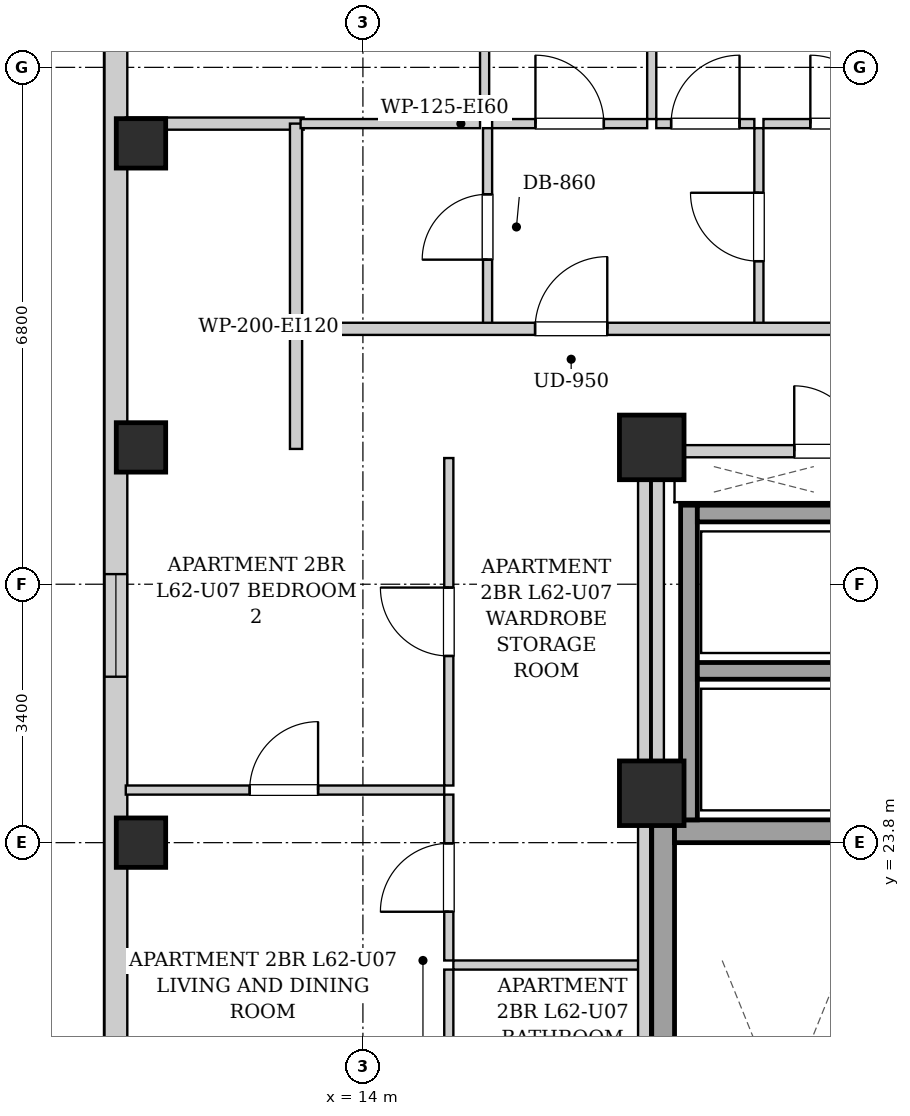
"""IFC4 building model, lengths in metres.
Left out: names, types, materials, properties, quantities, classifications, styles, units other than length and angle.
Written with IfcOpenShell. Run it as: python <this file> out.ifc"""

import sys

from ifc_helpers import new_model, si_unit, direction, frame, frame_2d, origin, origin_2d, place, context, subcontext, project, spatial, rectangle, extrude, element, fill, save


model = new_model("IFC4")
c1 = context("Model", 3, precision=1e-05, world=origin(), true_north=direction((0.0, 1.0)))
c2 = subcontext(c1, "Body", "Model", "MODEL_VIEW")
j1 = project(units=[si_unit("LENGTHUNIT", "METRE"), si_unit("PLANEANGLEUNIT", "RADIAN")], contexts=[c1])
p1 = place(None, origin())
s1 = spatial("IfcSite", under=j1, at=p1, CompositionType="ELEMENT")
p2 = place(p1, origin())
s2 = spatial("IfcBuilding", under=s1, at=p2, CompositionType="ELEMENT")
p3 = place(p2, frame((0.0, 0.0, 214.0)))
s3 = spatial("IfcBuildingStorey", under=s2, at=p3, CompositionType="ELEMENT", Elevation=214.0)
for number, where, z_axis, x_axis in (
    (1, (11.08, 23.8, 0.0), (0.0, 0.0, 1.0), (1.0, 0.0, 0.0)),
    (2, (11.08, 29.0, 0.0), (0.0, 0.0, 1.0), (1.0, 0.0, 0.0)),
    (3, (11.08, 33.0, 0.0), (0.0, 0.0, 1.0), (1.0, 0.0, 0.0)),
):
    element("IfcColumn", number, at=place(p3, frame(where, z_axis=z_axis, x_axis=x_axis)), inside=s3, PredefinedType="COLUMN", context=c2, shape_type="SweptSolid", body=[
        extrude(rectangle(XDim=0.65, YDim=0.65, at=origin_2d()), origin(), (0.0, 0.0, 1.0), 3.3),
    ])
for number, where, z_axis, x_axis in (
    (4, (17.8, 29.0, 0.0), (0.0, 0.0, 1.0), (1.0, 0.0, 0.0)),
    (5, (17.8, 24.45, 0.0), (0.0, 0.0, 1.0), (1.0, 0.0, 0.0)),
):
    element("IfcColumn", number, at=place(p3, frame(where, z_axis=z_axis, x_axis=x_axis)), inside=s3, PredefinedType="COLUMN", context=c2, shape_type="SweptSolid", body=[
        extrude(rectangle(XDim=0.85, YDim=0.85, at=origin_2d()), origin(), (0.0, 0.0, 1.0), 3.3),
    ])
p4 = place(p3, frame((10.75, 6.3, 0.0), z_axis=(0.0, 0.0, 1.0), x_axis=(0.0, 1.0, 0.0)))
e6 = element("IfcWall", 6, at=p4, inside=s3, PredefinedType="SOLIDWALL", context=c2, shape_type="SweptSolid", body=[
    extrude(rectangle(XDim=31.4, YDim=0.3, at=frame_2d((15.7, 0.0))), origin(), (0.0, 0.0, 1.0), 3.04),
])
p5 = place(p4, frame((28.396, 0.0, 0.55)))
e7 = element("IfcOpeningElement", 7, at=p5, cuts=e6, PredefinedType="OPENING", context=c2, shape_type="SweptSolid", body=[
    extrude(rectangle(XDim=1.35, YDim=1.2, at=frame_2d((0.675, 0.6))), frame((0.0, 0.16, 0.0), z_axis=(0.0, -1.0, 0.0), x_axis=(1.0, 0.0, 0.0)), (0.0, 0.0, 1.0), 0.32),
])
p6 = place(p4, frame((10.367, 0.0, 0.55)))
e8 = element("IfcOpeningElement", 8, at=p6, cuts=e6, PredefinedType="OPENING", context=c2, shape_type="SweptSolid", body=[
    extrude(rectangle(XDim=1.35, YDim=1.2, at=frame_2d((0.675, 0.6))), frame((0.0, 0.16, 0.0), z_axis=(0.0, -1.0, 0.0), x_axis=(1.0, 0.0, 0.0)), (0.0, 0.0, 1.0), 0.32),
])
p7 = place(p4, frame((19.683, 0.0, 0.55)))
e9 = element("IfcOpeningElement", 9, at=p7, cuts=e6, PredefinedType="OPENING", context=c2, shape_type="SweptSolid", body=[
    extrude(rectangle(XDim=1.35, YDim=1.2, at=frame_2d((0.675, 0.6))), frame((0.0, 0.16, 0.0), z_axis=(0.0, -1.0, 0.0), x_axis=(1.0, 0.0, 0.0)), (0.0, 0.0, 1.0), 0.32),
])
p8 = place(p3, frame((17.95, 15.1, 0.0), z_axis=(0.0, 0.0, 1.0), x_axis=(0.0, 1.0, 0.0)))
e10 = element("IfcWall", 10, at=p8, inside=s3, PredefinedType="SHEAR", context=c2, shape_type="SweptSolid", body=[
    extrude(rectangle(XDim=9.0, YDim=0.3, at=frame_2d((4.5, 0.0))), origin(), (0.0, 0.0, 1.0), 3.04),
])
p9 = place(p3, frame((18.1, 23.95, 0.0), z_axis=(0.0, 0.0, 1.0), x_axis=(1.0, 0.0, 0.0)))
e11 = element("IfcWall", 11, at=p9, inside=s3, PredefinedType="SHEAR", context=c2, shape_type="SweptSolid", body=[
    extrude(rectangle(XDim=2.85, YDim=0.3, at=frame_2d((1.425, 0.0))), origin(), (0.0, 0.0, 1.0), 3.04),
])
p10 = place(p3, frame((18.29, 24.1, 0.0), z_axis=(0.0, 0.0, 1.0), x_axis=(0.0, 1.0, 0.0)))
e12 = element("IfcWall", 12, at=p10, inside=s3, PredefinedType="SHEAR", context=c2, shape_type="SweptSolid", body=[
    extrude(rectangle(XDim=4.14, YDim=0.22, at=frame_2d((2.07, 0.0))), origin(), (0.0, 0.0, 1.0), 3.04),
])
for number, where, z_axis, x_axis in (
    (13, (18.4, 26.06, 0.0), (0.0, 0.0, 1.0), (1.0, 0.0, 0.0)),
    (14, (18.4, 28.13, 0.0), (0.0, 0.0, 1.0), (1.0, 0.0, 0.0)),
):
    element("IfcWall", number, at=place(p3, frame(where, z_axis=z_axis, x_axis=x_axis)), inside=s3, PredefinedType="SHEAR", context=c2, shape_type="SweptSolid", body=[
        extrude(rectangle(XDim=1.9, YDim=0.22, at=frame_2d((0.95, 0.0))), origin(), (0.0, 0.0, 1.0), 3.04),
    ])
p11 = place(p3, frame((17.88, 24.12, 0.0), z_axis=(0.0, 0.0, 1.0), x_axis=(0.0, 1.0, 0.0)))
e15 = element("IfcWall", 15, at=p11, inside=s3, PredefinedType="PARTITIONING", context=c2, shape_type="SweptSolid", body=[
    extrude(rectangle(XDim=4.76, YDim=0.16, at=frame_2d((2.38, 0.0))), origin(), (0.0, 0.0, 1.0), 3.04),
])
p12 = place(p3, frame((17.96, 28.95, 0.0), z_axis=(0.0, 0.0, 1.0), x_axis=(1.0, 0.0, 0.0)))
e16 = element("IfcWall", 16, at=p12, inside=s3, PredefinedType="PARTITIONING", context=c2, shape_type="SweptSolid", body=[
    extrude(rectangle(XDim=4.29, YDim=0.16, at=frame_2d((2.145, 0.0))), origin(), (0.0, 0.0, 1.0), 2.556),
])
p13 = place(p12, frame((1.715, 0.0, 0.0)))
e17 = element("IfcOpeningElement", 17, at=p13, cuts=e16, PredefinedType="OPENING", context=c2, shape_type="SweptSolid", body=[
    extrude(rectangle(XDim=0.86, YDim=2.05, at=frame_2d((0.43, 1.025))), frame((0.0, 0.09, 0.0), z_axis=(0.0, -1.0, 0.0), x_axis=(1.0, 0.0, 0.0)), (0.0, 0.0, 1.0), 0.18),
])
p14 = place(p3, frame((13.12, 28.98, 0.0), z_axis=(0.0, 0.0, 1.0), x_axis=(0.0, 1.0, 0.0)))
e18 = element("IfcWall", 18, at=p14, inside=s3, PredefinedType="PARTITIONING", context=c2, shape_type="SweptSolid", body=[
    extrude(rectangle(XDim=1.58, YDim=0.16, at=frame_2d((0.79, 0.0))), origin(), (0.0, 0.0, 1.0), 3.04),
])
p15 = place(p3, frame((10.88, 33.26, 0.0), z_axis=(0.0, 0.0, 1.0), x_axis=(1.0, 0.0, 0.0)))
e19 = element("IfcWall", 19, at=p15, inside=s3, PredefinedType="PARTITIONING", context=c2, shape_type="SweptSolid", body=[
    extrude(rectangle(XDim=2.34, YDim=0.16, at=frame_2d((1.17, 0.0))), origin(), (0.0, 0.0, 1.0), 3.04),
])
p16 = place(p3, frame((13.12, 30.6, 0.0), z_axis=(0.0, 0.0, 1.0), x_axis=(0.0, 1.0, 0.0)))
e20 = element("IfcWall", 20, at=p16, inside=s3, PredefinedType="PARTITIONING", context=c2, shape_type="SweptSolid", body=[
    extrude(rectangle(XDim=2.66, YDim=0.16, at=frame_2d((1.33, 0.0))), origin(), (0.0, 0.0, 1.0), 3.04),
])
p17 = place(p3, frame((15.64, 30.6, 0.0), z_axis=(0.0, 0.0, 1.0), x_axis=(0.0, 1.0, 0.0)))
e21 = element("IfcWall", 21, at=p17, inside=s3, PredefinedType="PARTITIONING", context=c2, shape_type="SweptSolid", body=[
    extrude(rectangle(XDim=2.6, YDim=0.12, at=frame_2d((1.3, 0.0))), origin(), (0.0, 0.0, 1.0), 3.04),
])
p18 = place(p17, frame((0.87, 0.0, 0.0)))
e22 = element("IfcOpeningElement", 22, at=p18, cuts=e21, PredefinedType="OPENING", context=c2, shape_type="SweptSolid", body=[
    extrude(rectangle(XDim=0.86, YDim=2.05, at=frame_2d((0.43, 1.025))), frame((0.0, 0.07, 0.0), z_axis=(0.0, -1.0, 0.0), x_axis=(1.0, 0.0, 0.0)), (0.0, 0.0, 1.0), 0.14),
])
p19 = place(p3, frame((13.18, 33.26, 0.0), z_axis=(0.0, 0.0, 1.0), x_axis=(1.0, 0.0, 0.0)))
e23 = element("IfcWall", 23, at=p19, inside=s3, PredefinedType="PARTITIONING", context=c2, shape_type="SweptSolid", body=[
    extrude(rectangle(XDim=2.361, YDim=0.12, at=frame_2d((1.181, 0.0))), origin(), (0.0, 0.0, 1.0), 3.04),
])
p20 = place(p3, frame((19.21, 30.6, 0.0), z_axis=(0.0, 0.0, 1.0), x_axis=(0.0, 1.0, 0.0)))
e24 = element("IfcWall", 24, at=p20, inside=s3, PredefinedType="PARTITIONING", context=c2, shape_type="SweptSolid", body=[
    extrude(rectangle(XDim=2.6, YDim=0.12, at=frame_2d((1.3, 0.0))), origin(), (0.0, 0.0, 1.0), 3.04),
])
p21 = place(p20, frame((0.85, 0.0, 0.0)))
e25 = element("IfcOpeningElement", 25, at=p21, cuts=e24, PredefinedType="OPENING", context=c2, shape_type="SweptSolid", body=[
    extrude(rectangle(XDim=0.9, YDim=2.05, at=frame_2d((0.45, 1.025))), frame((0.0, 0.07, 0.0), z_axis=(0.0, -1.0, 0.0), x_axis=(1.0, 0.0, 0.0)), (0.0, 0.0, 1.0), 0.14),
])
p22 = place(p3, frame((15.7, 33.26, 0.0), z_axis=(0.0, 0.0, 1.0), x_axis=(1.0, 0.0, 0.0)))
e26 = element("IfcWall", 26, at=p22, inside=s3, PredefinedType="PARTITIONING", context=c2, shape_type="SweptSolid", body=[
    extrude(rectangle(XDim=2.04, YDim=0.12, at=frame_2d((1.02, 0.0))), origin(), (0.0, 0.0, 1.0), 3.04),
])
p23 = place(p22, frame((0.57, 0.0, 0.0)))
e27 = element("IfcOpeningElement", 27, at=p23, cuts=e26, PredefinedType="OPENING", context=c2, shape_type="SweptSolid", body=[
    extrude(rectangle(XDim=0.9, YDim=2.05, at=frame_2d((0.45, 1.025))), frame((0.0, 0.07, 0.0), z_axis=(0.0, -1.0, 0.0), x_axis=(1.0, 0.0, 0.0)), (0.0, 0.0, 1.0), 0.14),
])
p24 = place(p3, frame((17.86, 33.26, 0.0), z_axis=(0.0, 0.0, 1.0), x_axis=(1.0, 0.0, 0.0)))
e28 = element("IfcWall", 28, at=p24, inside=s3, PredefinedType="PARTITIONING", context=c2, shape_type="SweptSolid", body=[
    extrude(rectangle(XDim=1.29, YDim=0.12, at=frame_2d((0.645, 0.0))), origin(), (0.0, 0.0, 1.0), 3.04),
])
p25 = place(p24, frame((0.195, 0.0, 0.0)))
e29 = element("IfcOpeningElement", 29, at=p25, cuts=e28, PredefinedType="OPENING", context=c2, shape_type="SweptSolid", body=[
    extrude(rectangle(XDim=0.9, YDim=2.05, at=frame_2d((0.45, 1.025))), frame((0.0, 0.07, 0.0), z_axis=(0.0, -1.0, 0.0), x_axis=(1.0, 0.0, 0.0)), (0.0, 0.0, 1.0), 0.14),
])
p26 = place(p3, frame((19.27, 33.26, 0.0), z_axis=(0.0, 0.0, 1.0), x_axis=(1.0, 0.0, 0.0)))
e30 = element("IfcWall", 30, at=p26, inside=s3, PredefinedType="PARTITIONING", context=c2, shape_type="SweptSolid", body=[
    extrude(rectangle(XDim=2.135, YDim=0.12, at=frame_2d((1.067, 0.0))), origin(), (0.0, 0.0, 1.0), 3.04),
])
p27 = place(p26, frame((0.617, 0.0, 0.0)))
e31 = element("IfcOpeningElement", 31, at=p27, cuts=e30, PredefinedType="OPENING", context=c2, shape_type="SweptSolid", body=[
    extrude(rectangle(XDim=0.9, YDim=2.05, at=frame_2d((0.45, 1.025))), frame((0.0, 0.07, 0.0), z_axis=(0.0, -1.0, 0.0), x_axis=(1.0, 0.0, 0.0)), (0.0, 0.0, 1.0), 0.14),
])
p28 = place(p3, frame((15.601, 33.32, 0.0), z_axis=(0.0, 0.0, 1.0), x_axis=(0.0, 1.0, 0.0)))
e32 = element("IfcWall", 32, at=p28, inside=s3, PredefinedType="PARTITIONING", context=c2, shape_type="SweptSolid", body=[
    extrude(rectangle(XDim=6.6, YDim=0.12, at=frame_2d((3.3, 0.0))), origin(), (0.0, 0.0, 1.0), 3.04),
])
p29 = place(p28, frame((2.835, 0.0, 0.0)))
e33 = element("IfcOpeningElement", 33, at=p29, cuts=e32, PredefinedType="OPENING", context=c2, shape_type="SweptSolid", body=[
    extrude(rectangle(XDim=0.9, YDim=2.05, at=frame_2d((0.45, 1.025))), frame((0.0, 0.07, 0.0), z_axis=(0.0, -1.0, 0.0), x_axis=(1.0, 0.0, 0.0)), (0.0, 0.0, 1.0), 0.14),
])
p30 = place(p3, frame((17.8, 33.32, 0.0), z_axis=(0.0, 0.0, 1.0), x_axis=(0.0, 1.0, 0.0)))
e34 = element("IfcWall", 34, at=p30, inside=s3, PredefinedType="PARTITIONING", context=c2, shape_type="SweptSolid", body=[
    extrude(rectangle(XDim=6.6, YDim=0.12, at=frame_2d((3.3, 0.0))), origin(), (0.0, 0.0, 1.0), 2.556),
])
p31 = place(p30, frame((2.835, 0.0, 0.0)))
e35 = element("IfcOpeningElement", 35, at=p31, cuts=e34, PredefinedType="OPENING", context=c2, shape_type="SweptSolid", body=[
    extrude(rectangle(XDim=0.9, YDim=2.05, at=frame_2d((0.45, 1.025))), frame((0.0, 0.07, 0.0), z_axis=(0.0, -1.0, 0.0), x_axis=(1.0, 0.0, 0.0)), (0.0, 0.0, 1.0), 0.14),
])
p32 = place(p3, frame((15.19, 22.19, 0.0), z_axis=(0.0, 0.0, 1.0), x_axis=(1.0, 0.0, 0.0)))
e36 = element("IfcWall", 36, at=p32, inside=s3, PredefinedType="PARTITIONING", context=c2, shape_type="SweptSolid", body=[
    extrude(rectangle(XDim=2.45, YDim=0.12, at=frame_2d((1.225, 0.0))), origin(), (0.0, 0.0, 1.0), 3.04),
])
p33 = place(p3, frame((15.13, 22.25, 0.0), z_axis=(0.0, 0.0, 1.0), x_axis=(0.0, 1.0, 0.0)))
e37 = element("IfcWall", 37, at=p33, inside=s3, PredefinedType="PARTITIONING", context=c2, shape_type="SweptSolid", body=[
    extrude(rectangle(XDim=2.182, YDim=0.12, at=frame_2d((1.091, 0.0))), origin(), (0.0, 0.0, 1.0), 3.04),
])
p34 = place(p33, frame((0.641, 0.0, 0.0)))
e38 = element("IfcOpeningElement", 38, at=p34, cuts=e37, PredefinedType="OPENING", context=c2, shape_type="SweptSolid", body=[
    extrude(rectangle(XDim=0.9, YDim=2.05, at=frame_2d((0.45, 1.025))), frame((0.0, 0.07, 0.0), z_axis=(0.0, -1.0, 0.0), x_axis=(1.0, 0.0, 0.0)), (0.0, 0.0, 1.0), 0.14),
])
p35 = place(p3, frame((15.13, 24.552, 0.0), z_axis=(0.0, 0.0, 1.0), x_axis=(0.0, 1.0, 0.0)))
e39 = element("IfcWall", 39, at=p35, inside=s3, PredefinedType="PARTITIONING", context=c2, shape_type="SweptSolid", body=[
    extrude(rectangle(XDim=4.308, YDim=0.12, at=frame_2d((2.154, 0.0))), origin(), (0.0, 0.0, 1.0), 3.04),
])
p36 = place(p35, frame((1.704, 0.0, 0.0)))
e40 = element("IfcOpeningElement", 40, at=p36, cuts=e39, PredefinedType="OPENING", context=c2, shape_type="SweptSolid", body=[
    extrude(rectangle(XDim=0.9, YDim=2.05, at=frame_2d((0.45, 1.025))), frame((0.0, 0.07, 0.0), z_axis=(0.0, -1.0, 0.0), x_axis=(1.0, 0.0, 0.0)), (0.0, 0.0, 1.0), 0.14),
])
p37 = place(p3, frame((15.13, 19.83, 0.0), z_axis=(0.0, 0.0, 1.0), x_axis=(0.0, 1.0, 0.0)))
e41 = element("IfcWall", 41, at=p37, inside=s3, PredefinedType="PARTITIONING", context=c2, shape_type="SweptSolid", body=[
    extrude(rectangle(XDim=2.3, YDim=0.12, at=frame_2d((1.15, 0.0))), origin(), (0.0, 0.0, 1.0), 3.04),
])
p38 = place(p3, frame((10.88, 24.492, 0.0), z_axis=(0.0, 0.0, 1.0), x_axis=(1.0, 0.0, 0.0)))
e42 = element("IfcWall", 42, at=p38, inside=s3, PredefinedType="PARTITIONING", context=c2, shape_type="SweptSolid", body=[
    extrude(rectangle(XDim=4.19, YDim=0.12, at=frame_2d((2.095, 0.0))), origin(), (0.0, 0.0, 1.0), 2.722),
])
p39 = place(p38, frame((1.63, 0.0, 0.0)))
e43 = element("IfcOpeningElement", 43, at=p39, cuts=e42, PredefinedType="OPENING", context=c2, shape_type="SweptSolid", body=[
    extrude(rectangle(XDim=0.9, YDim=2.05, at=frame_2d((0.45, 1.025))), frame((0.0, 0.07, 0.0), z_axis=(0.0, -1.0, 0.0), x_axis=(1.0, 0.0, 0.0)), (0.0, 0.0, 1.0), 0.14),
])
p40 = place(p3, frame((13.15, 30.56, 0.0), z_axis=(0.0, 0.0, 1.0), x_axis=(1.0, 0.0, 0.0)))
e44 = element("IfcWall", 44, at=p40, inside=s3, PredefinedType="PARTITIONING", context=c2, shape_type="SweptSolid", body=[
    extrude(rectangle(XDim=24.6, YDim=0.16, at=frame_2d((12.3, 0.0))), origin(), (0.0, 0.0, 1.0), 3.04),
])
p41 = place(p40, frame((3.115, 0.0, 0.0)))
e45 = element("IfcOpeningElement", 45, at=p41, cuts=e44, PredefinedType="OPENING", context=c2, shape_type="SweptSolid", body=[
    extrude(rectangle(XDim=0.95, YDim=2.1, at=frame_2d((0.475, 1.05))), frame((0.0, 0.09, 0.0), z_axis=(0.0, -1.0, 0.0), x_axis=(1.0, 0.0, 0.0)), (0.0, 0.0, 1.0), 0.18),
])
p42 = place(p40, frame((11.489, 0.0, 0.0)))
e46 = element("IfcOpeningElement", 46, at=p42, cuts=e44, PredefinedType="OPENING", context=c2, shape_type="SweptSolid", body=[
    extrude(rectangle(XDim=0.95, YDim=2.1, at=frame_2d((0.475, 1.05))), frame((0.0, 0.09, 0.0), z_axis=(0.0, -1.0, 0.0), x_axis=(1.0, 0.0, 0.0)), (0.0, 0.0, 1.0), 0.18),
])
p43 = place(p40, frame((17.707, 0.0, 0.0)))
e47 = element("IfcOpeningElement", 47, at=p43, cuts=e44, PredefinedType="OPENING", context=c2, shape_type="SweptSolid", body=[
    extrude(rectangle(XDim=0.95, YDim=2.1, at=frame_2d((0.475, 1.05))), frame((0.0, 0.09, 0.0), z_axis=(0.0, -1.0, 0.0), x_axis=(1.0, 0.0, 0.0)), (0.0, 0.0, 1.0), 0.18),
])
p44 = place(p3, frame((17.7, 15.02, 0.0), z_axis=(0.0, 0.0, 1.0), x_axis=(0.0, 1.0, 0.0)))
e48 = element("IfcWall", 48, at=p44, inside=s3, PredefinedType="PARTITIONING", context=c2, shape_type="SweptSolid", body=[
    extrude(rectangle(XDim=13.98, YDim=0.16, at=frame_2d((6.99, 0.0))), origin(), (0.0, 0.0, 1.0), 3.04),
])
p45 = place(p13, origin())
e49 = element("IfcDoor", 49, at=p45, inside=s3, OperationType="SINGLE_SWING_LEFT", PredefinedType="DOOR", context=c2, shape_type="SweptSolid", body=[
    extrude(rectangle(XDim=0.86, YDim=2.05, at=frame_2d((0.43, 1.025))), frame((0.0, 0.025, 0.0), z_axis=(0.0, -1.0, 0.0), x_axis=(1.0, 0.0, 0.0)), (0.0, 0.0, 1.0), 0.05),
])
fill(e17, e49)
p46 = place(p18, origin())
e50 = element("IfcDoor", 50, at=p46, inside=s3, OperationType="SINGLE_SWING_LEFT", PredefinedType="DOOR", context=c2, shape_type="SweptSolid", body=[
    extrude(rectangle(XDim=0.86, YDim=2.05, at=frame_2d((0.43, 1.025))), frame((0.0, 0.025, 0.0), z_axis=(0.0, -1.0, 0.0), x_axis=(1.0, 0.0, 0.0)), (0.0, 0.0, 1.0), 0.05),
])
fill(e22, e50)
p47 = place(p21, origin())
e51 = element("IfcDoor", 51, at=p47, inside=s3, OperationType="SINGLE_SWING_RIGHT", PredefinedType="DOOR", context=c2, shape_type="SweptSolid", body=[
    extrude(rectangle(XDim=0.9, YDim=2.05, at=frame_2d((0.45, 1.025))), frame((0.0, 0.025, 0.0), z_axis=(0.0, -1.0, 0.0), x_axis=(1.0, 0.0, 0.0)), (0.0, 0.0, 1.0), 0.05),
])
fill(e25, e51)
p48 = place(p23, origin())
e52 = element("IfcDoor", 52, at=p48, inside=s3, OperationType="SINGLE_SWING_LEFT", PredefinedType="DOOR", context=c2, shape_type="SweptSolid", body=[
    extrude(rectangle(XDim=0.9, YDim=2.05, at=frame_2d((0.45, 1.025))), frame((0.0, 0.025, 0.0), z_axis=(0.0, -1.0, 0.0), x_axis=(1.0, 0.0, 0.0)), (0.0, 0.0, 1.0), 0.05),
])
fill(e27, e52)
p49 = place(p25, origin())
e53 = element("IfcDoor", 53, at=p49, inside=s3, OperationType="SINGLE_SWING_RIGHT", PredefinedType="DOOR", context=c2, shape_type="SweptSolid", body=[
    extrude(rectangle(XDim=0.9, YDim=2.05, at=frame_2d((0.45, 1.025))), frame((0.0, 0.025, 0.0), z_axis=(0.0, -1.0, 0.0), x_axis=(1.0, 0.0, 0.0)), (0.0, 0.0, 1.0), 0.05),
])
fill(e29, e53)
p50 = place(p27, origin())
e54 = element("IfcDoor", 54, at=p50, inside=s3, OperationType="SINGLE_SWING_LEFT", PredefinedType="DOOR", context=c2, shape_type="SweptSolid", body=[
    extrude(rectangle(XDim=0.9, YDim=2.05, at=frame_2d((0.45, 1.025))), frame((0.0, 0.025, 0.0), z_axis=(0.0, -1.0, 0.0), x_axis=(1.0, 0.0, 0.0)), (0.0, 0.0, 1.0), 0.05),
])
fill(e31, e54)
p51 = place(p34, origin())
e55 = element("IfcDoor", 55, at=p51, inside=s3, OperationType="SINGLE_SWING_LEFT", PredefinedType="DOOR", context=c2, shape_type="SweptSolid", body=[
    extrude(rectangle(XDim=0.9, YDim=2.05, at=frame_2d((0.45, 1.025))), frame((0.0, 0.025, 0.0), z_axis=(0.0, -1.0, 0.0), x_axis=(1.0, 0.0, 0.0)), (0.0, 0.0, 1.0), 0.05),
])
fill(e38, e55)
p52 = place(p36, origin())
e56 = element("IfcDoor", 56, at=p52, inside=s3, OperationType="SINGLE_SWING_RIGHT", PredefinedType="DOOR", context=c2, shape_type="SweptSolid", body=[
    extrude(rectangle(XDim=0.9, YDim=2.05, at=frame_2d((0.45, 1.025))), frame((0.0, 0.025, 0.0), z_axis=(0.0, -1.0, 0.0), x_axis=(1.0, 0.0, 0.0)), (0.0, 0.0, 1.0), 0.05),
])
fill(e40, e56)
p53 = place(p39, origin())
e57 = element("IfcDoor", 57, at=p53, inside=s3, OperationType="SINGLE_SWING_RIGHT", PredefinedType="DOOR", context=c2, shape_type="SweptSolid", body=[
    extrude(rectangle(XDim=0.9, YDim=2.05, at=frame_2d((0.45, 1.025))), frame((0.0, 0.025, 0.0), z_axis=(0.0, -1.0, 0.0), x_axis=(1.0, 0.0, 0.0)), (0.0, 0.0, 1.0), 0.05),
])
fill(e43, e57)
p54 = place(p41, origin())
e58 = element("IfcDoor", 58, at=p54, inside=s3, OperationType="SINGLE_SWING_RIGHT", PredefinedType="DOOR", context=c2, shape_type="SweptSolid", body=[
    extrude(rectangle(XDim=0.95, YDim=2.1, at=frame_2d((0.475, 1.05))), frame((0.0, 0.025, 0.0), z_axis=(0.0, -1.0, 0.0), x_axis=(1.0, 0.0, 0.0)), (0.0, 0.0, 1.0), 0.05),
])
fill(e45, e58)
p55 = place(p7, origin())
e59 = element("IfcWindow", 59, at=p55, inside=s3, PartitioningType="SINGLE_PANEL", PredefinedType="WINDOW", context=c2, shape_type="SweptSolid", body=[
    extrude(rectangle(XDim=1.35, YDim=1.2, at=frame_2d((0.675, 0.6))), frame((0.0, 0.03, 0.0), z_axis=(0.0, -1.0, 0.0), x_axis=(1.0, 0.0, 0.0)), (0.0, 0.0, 1.0), 0.06),
])
fill(e9, e59)
save(model, sys.argv[1])
